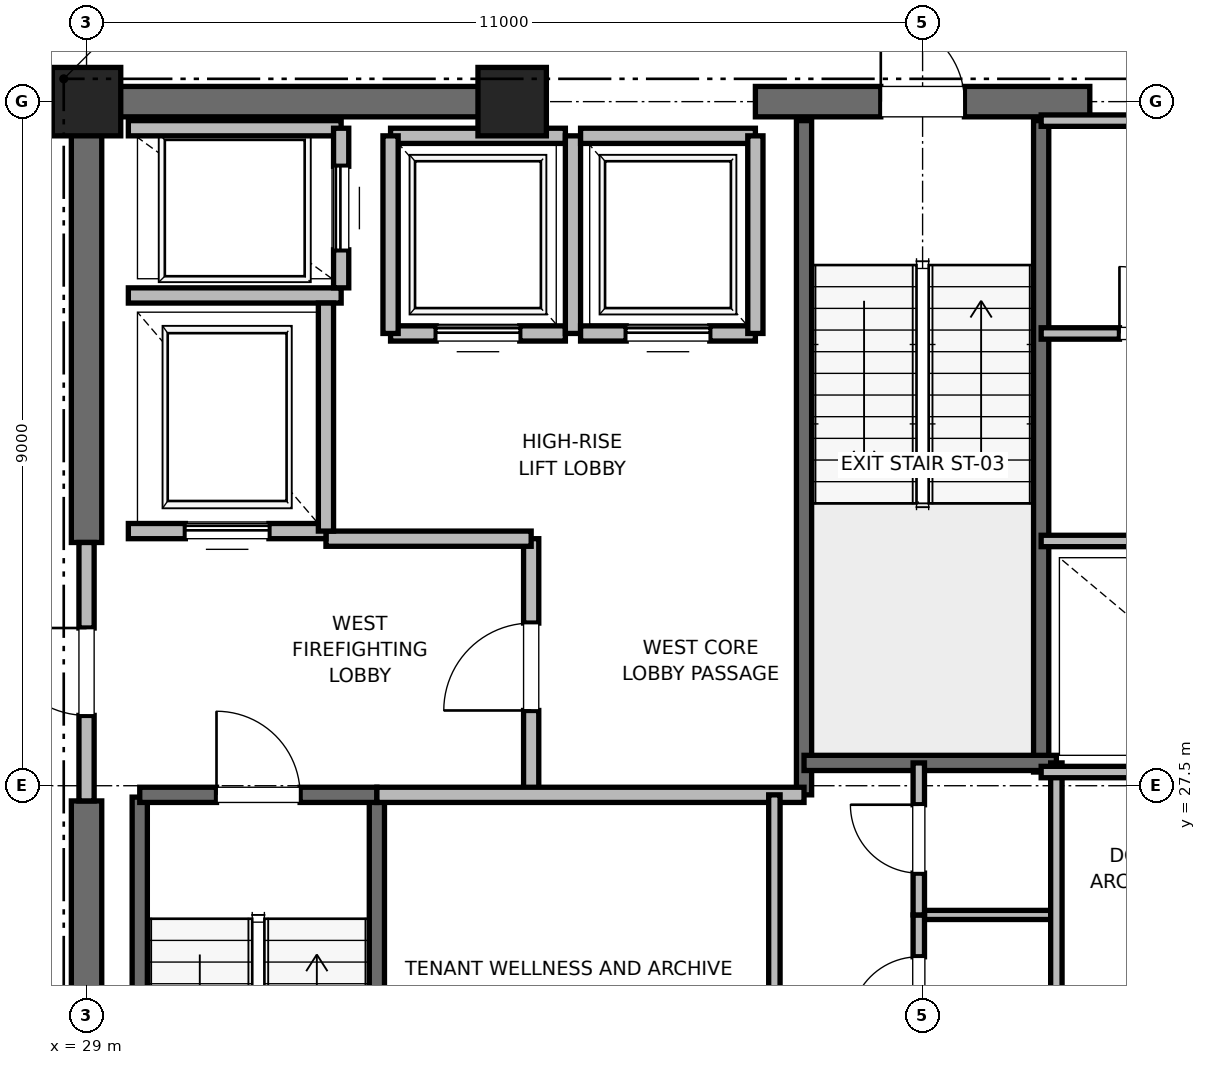
"""IFC4 building model, lengths in metres.
Left out: names, types, materials, properties, quantities, classifications, styles, units other than length and angle.
Written with IfcOpenShell. Run it as: python <this file> out.ifc"""

import sys

from ifc_helpers import new_model, si_unit, direction, frame, frame_2d, origin, origin_2d, place, context, subcontext, project, spatial, rectangle, extrude, element, fill, save


model = new_model("IFC4")
c1 = context("Model", 3, precision=1e-05, world=origin(), true_north=direction((0.0, 1.0)))
c2 = subcontext(c1, "Body", "Model", "MODEL_VIEW")
j1 = project(units=[si_unit("LENGTHUNIT", "METRE"), si_unit("PLANEANGLEUNIT", "RADIAN")], contexts=[c1])
p1 = place(None, origin())
s1 = spatial("IfcSite", under=j1, at=p1, CompositionType="ELEMENT")
p2 = place(p1, origin())
s2 = spatial("IfcBuilding", under=s1, at=p2, CompositionType="ELEMENT")
p3 = place(p2, frame((0.0, 0.0, 310.8)))
s3 = spatial("IfcBuildingStorey", under=s2, at=p3, CompositionType="ELEMENT", Elevation=310.8)
for number, where, z_axis, x_axis in (
    (1, (29.0, 36.5, 0.0), (0.0, 0.0, 1.0), (1.0, 0.0, 0.0)),
    (2, (34.6, 36.5, 0.0), (0.0, 0.0, 1.0), (1.0, 0.0, 0.0)),
):
    element("IfcColumn", number, at=place(p3, frame(where, z_axis=z_axis, x_axis=x_axis)), inside=s3, PredefinedType="PILASTER", context=c2, shape_type="SweptSolid", body=[
        extrude(rectangle(XDim=0.9, YDim=0.9, at=origin_2d()), origin(), (0.0, 0.0, 1.0), 4.0),
    ])
p4 = place(p3, frame((29.0, 36.5, 0.0), z_axis=(0.0, 0.0, 1.0), x_axis=(1.0, 0.0, 0.0)))
e3 = element("IfcWall", 3, at=p4, inside=s3, PredefinedType="SHEAR", context=c2, shape_type="SweptSolid", body=[
    extrude(rectangle(XDim=5.8, YDim=0.4, at=frame_2d((2.9, 0.0))), origin(), (0.0, 0.0, 1.0), 3.785),
])
p5 = place(p3, frame((37.8, 36.5, 0.0), z_axis=(0.0, 0.0, 1.0), x_axis=(1.0, 0.0, 0.0)))
e4 = element("IfcWall", 4, at=p5, inside=s3, PredefinedType="SHEAR", context=c2, shape_type="SweptSolid", body=[
    extrude(rectangle(XDim=4.4, YDim=0.4, at=frame_2d((2.2, 0.0))), origin(), (0.0, 0.0, 1.0), 3.785),
])
p6 = place(p5, frame((1.65, 0.0, 0.0)))
e5 = element("IfcOpeningElement", 5, at=p6, cuts=e4, PredefinedType="OPENING", context=c2, shape_type="SweptSolid", body=[
    extrude(rectangle(XDim=1.1, YDim=2.15, at=frame_2d((0.55, 1.075))), frame((0.0, 0.2, 0.0), z_axis=(0.0, -1.0, 0.0), x_axis=(1.0, 0.0, 0.0)), (0.0, 0.0, 1.0), 0.4),
])
p7 = place(p3, frame((29.0, 18.5, 0.0), z_axis=(0.0, 0.0, 1.0), x_axis=(0.0, 1.0, 0.0)))
e6 = element("IfcWall", 6, at=p7, inside=s3, PredefinedType="SHEAR", context=c2, shape_type="SweptSolid", body=[
    extrude(rectangle(XDim=8.8, YDim=0.4, at=frame_2d((4.4, 0.0))), origin(), (0.0, 0.0, 1.0), 3.785),
])
p8 = place(p3, frame((29.0, 30.7, 0.0), z_axis=(0.0, 0.0, 1.0), x_axis=(0.0, 1.0, 0.0)))
e7 = element("IfcWall", 7, at=p8, inside=s3, PredefinedType="SHEAR", context=c2, shape_type="SweptSolid", body=[
    extrude(rectangle(XDim=5.8, YDim=0.4, at=frame_2d((2.9, 0.0))), origin(), (0.0, 0.0, 1.0), 3.785),
])
p9 = place(p3, frame((29.7, 19.2, 0.0), z_axis=(0.0, 0.0, 1.0), x_axis=(0.0, 1.0, 0.0)))
e8 = element("IfcWall", 8, at=p9, inside=s3, PredefinedType="SOLIDWALL", context=c2, shape_type="SweptSolid", body=[
    extrude(rectangle(XDim=8.15, YDim=0.2, at=frame_2d((4.075, 0.0))), origin(), (0.0, 0.0, 1.0), 3.785),
])
p10 = place(p3, frame((32.82, 18.6, 0.0), z_axis=(0.0, 0.0, 1.0), x_axis=(0.0, 1.0, 0.0)))
e9 = element("IfcWall", 9, at=p10, inside=s3, PredefinedType="SOLIDWALL", context=c2, shape_type="SweptSolid", body=[
    extrude(rectangle(XDim=8.78, YDim=0.2, at=frame_2d((4.39, 0.0))), origin(), (0.0, 0.0, 1.0), 3.785),
])
p11 = place(p3, frame((29.7, 27.38, 0.0), z_axis=(0.0, 0.0, 1.0), x_axis=(1.0, 0.0, 0.0)))
e10 = element("IfcWall", 10, at=p11, inside=s3, PredefinedType="SOLIDWALL", context=c2, shape_type="SweptSolid", body=[
    extrude(rectangle(XDim=3.12, YDim=0.2, at=frame_2d((1.56, 0.0))), origin(), (0.0, 0.0, 1.0), 3.785),
])
p12 = place(p11, frame((1.01, 0.0, 0.0)))
e11 = element("IfcOpeningElement", 11, at=p12, cuts=e10, PredefinedType="OPENING", context=c2, shape_type="SweptSolid", body=[
    extrude(rectangle(XDim=1.1, YDim=2.15, at=frame_2d((0.55, 1.075))), frame((0.0, 0.1, 0.0), z_axis=(0.0, -1.0, 0.0), x_axis=(1.0, 0.0, 0.0)), (0.0, 0.0, 1.0), 0.2),
])
p13 = place(p3, frame((38.44, 27.38, 0.0), z_axis=(0.0, 0.0, 1.0), x_axis=(0.0, 1.0, 0.0)))
e12 = element("IfcWall", 12, at=p13, inside=s3, PredefinedType="SOLIDWALL", context=c2, shape_type="SweptSolid", body=[
    extrude(rectangle(XDim=8.87, YDim=0.2, at=frame_2d((4.435, 0.0))), origin(), (0.0, 0.0, 1.0), 3.785),
])
p14 = place(p3, frame((41.56, 27.68, 0.0), z_axis=(0.0, 0.0, 1.0), x_axis=(0.0, 1.0, 0.0)))
e13 = element("IfcWall", 13, at=p14, inside=s3, PredefinedType="SOLIDWALL", context=c2, shape_type="SweptSolid", body=[
    extrude(rectangle(XDim=8.57, YDim=0.2, at=frame_2d((4.285, 0.0))), origin(), (0.0, 0.0, 1.0), 3.785),
])
p15 = place(p3, frame((38.44, 27.8, 0.0), z_axis=(0.0, 0.0, 1.0), x_axis=(1.0, 0.0, 0.0)))
e14 = element("IfcWall", 14, at=p15, inside=s3, PredefinedType="SOLIDWALL", context=c2, shape_type="SweptSolid", body=[
    extrude(rectangle(XDim=3.32, YDim=0.2, at=frame_2d((1.66, 0.0))), origin(), (0.0, 0.0, 1.0), 3.785),
])
p16 = place(p3, frame((34.85, 27.38, 0.0), z_axis=(0.0, 0.0, 1.0), x_axis=(0.0, 1.0, 0.0)))
e15 = element("IfcWall", 15, at=p16, inside=s3, PredefinedType="PARTITIONING", context=c2, shape_type="SweptSolid", body=[
    extrude(rectangle(XDim=3.37, YDim=0.2, at=frame_2d((1.685, 0.0))), origin(), (0.0, 0.0, 1.0), 3.785),
])
p17 = place(p16, frame((1.11, 0.0, 0.0)))
e16 = element("IfcOpeningElement", 16, at=p17, cuts=e15, PredefinedType="OPENING", context=c2, shape_type="SweptSolid", body=[
    extrude(rectangle(XDim=1.15, YDim=2.2, at=frame_2d((0.575, 1.1))), frame((0.0, 0.1, 0.0), z_axis=(0.0, -1.0, 0.0), x_axis=(1.0, 0.0, 0.0)), (0.0, 0.0, 1.0), 0.2),
])
p18 = place(p3, frame((29.0, 27.3, 0.0), z_axis=(0.0, 0.0, 1.0), x_axis=(0.0, 1.0, 0.0)))
e17 = element("IfcWall", 17, at=p18, inside=s3, PredefinedType="PARTITIONING", context=c2, shape_type="SweptSolid", body=[
    extrude(rectangle(XDim=3.4, YDim=0.2, at=frame_2d((1.7, 0.0))), origin(), (0.0, 0.0, 1.0), 2.865),
])
p19 = place(p18, frame((1.125, 0.0, 0.0)))
e18 = element("IfcOpeningElement", 18, at=p19, cuts=e17, PredefinedType="OPENING", context=c2, shape_type="SweptSolid", body=[
    extrude(rectangle(XDim=1.15, YDim=2.2, at=frame_2d((0.575, 1.1))), frame((0.0, 0.1, 0.0), z_axis=(0.0, -1.0, 0.0), x_axis=(1.0, 0.0, 0.0)), (0.0, 0.0, 1.0), 0.2),
])
p20 = place(p3, frame((32.82, 27.38, 0.0), z_axis=(0.0, 0.0, 1.0), x_axis=(1.0, 0.0, 0.0)))
e19 = element("IfcWall", 19, at=p20, inside=s3, PredefinedType="PARTITIONING", context=c2, shape_type="SweptSolid", body=[
    extrude(rectangle(XDim=5.62, YDim=0.2, at=frame_2d((2.81, 0.0))), origin(), (0.0, 0.0, 1.0), 3.785),
])
p21 = place(p3, frame((32.15, 30.75, 0.0), z_axis=(0.0, 0.0, 1.0), x_axis=(1.0, 0.0, 0.0)))
e20 = element("IfcWall", 20, at=p21, inside=s3, PredefinedType="PARTITIONING", context=c2, shape_type="SweptSolid", body=[
    extrude(rectangle(XDim=2.7, YDim=0.2, at=frame_2d((1.35, 0.0))), origin(), (0.0, 0.0, 1.0), 3.785),
])
p22 = place(p3, frame((29.55, 30.85, 0.0), z_axis=(0.0, 0.0, 1.0), x_axis=(1.0, 0.0, 0.0)))
e21 = element("IfcWall", 21, at=p22, inside=s3, PredefinedType="SOLIDWALL", context=c2, shape_type="SweptSolid", body=[
    extrude(rectangle(XDim=2.6, YDim=0.2, at=frame_2d((1.3, 0.0))), origin(), (0.0, 0.0, 1.0), 2.865),
])
p23 = place(p22, frame((0.75, 0.0, 0.0)))
e22 = element("IfcOpeningElement", 22, at=p23, cuts=e21, PredefinedType="OPENING", context=c2, shape_type="SweptSolid", body=[
    extrude(rectangle(XDim=1.1, YDim=2.2, at=frame_2d((0.55, 1.1))), frame((0.0, 0.1, 0.0), z_axis=(0.0, -1.0, 0.0), x_axis=(1.0, 0.0, 0.0)), (0.0, 0.0, 1.0), 0.2),
])
p24 = place(p3, frame((29.55, 33.95, 0.0), z_axis=(0.0, 0.0, 1.0), x_axis=(1.0, 0.0, 0.0)))
e23 = element("IfcWall", 23, at=p24, inside=s3, PredefinedType="SOLIDWALL", context=c2, shape_type="SweptSolid", body=[
    extrude(rectangle(XDim=2.8, YDim=0.2, at=frame_2d((1.4, 0.0))), origin(), (0.0, 0.0, 1.0), 3.785),
])
p25 = place(p3, frame((32.15, 30.85, 0.0), z_axis=(0.0, 0.0, 1.0), x_axis=(0.0, 1.0, 0.0)))
e24 = element("IfcWall", 24, at=p25, inside=s3, PredefinedType="SOLIDWALL", context=c2, shape_type="SweptSolid", body=[
    extrude(rectangle(XDim=3.0, YDim=0.2, at=frame_2d((1.5, 0.0))), origin(), (0.0, 0.0, 1.0), 3.785),
])
p26 = place(p3, frame((32.35, 36.15, 0.0), z_axis=(0.0, 0.0, 1.0), x_axis=(-1.0, 0.0, 0.0)))
e25 = element("IfcWall", 25, at=p26, inside=s3, PredefinedType="SOLIDWALL", context=c2, shape_type="SweptSolid", body=[
    extrude(rectangle(XDim=2.8, YDim=0.2, at=frame_2d((1.4, 0.0))), origin(), (0.0, 0.0, 1.0), 3.22),
])
p27 = place(p3, frame((32.35, 34.05, 0.0), z_axis=(0.0, 0.0, 1.0), x_axis=(0.0, 1.0, 0.0)))
e26 = element("IfcWall", 26, at=p27, inside=s3, PredefinedType="SOLIDWALL", context=c2, shape_type="SweptSolid", body=[
    extrude(rectangle(XDim=2.1, YDim=0.2, at=frame_2d((1.05, 0.0))), origin(), (0.0, 0.0, 1.0), 3.785),
])
p28 = place(p27, frame((0.5, 0.0, 0.0)))
e27 = element("IfcOpeningElement", 27, at=p28, cuts=e26, PredefinedType="OPENING", context=c2, shape_type="SweptSolid", body=[
    extrude(rectangle(XDim=1.1, YDim=2.2, at=frame_2d((0.55, 1.1))), frame((0.0, 0.1, 0.0), z_axis=(0.0, -1.0, 0.0), x_axis=(1.0, 0.0, 0.0)), (0.0, 0.0, 1.0), 0.2),
])
p29 = place(p3, frame((33.0, 33.45, 0.0), z_axis=(0.0, 0.0, 1.0), x_axis=(1.0, 0.0, 0.0)))
e28 = element("IfcWall", 28, at=p29, inside=s3, PredefinedType="SOLIDWALL", context=c2, shape_type="SweptSolid", body=[
    extrude(rectangle(XDim=2.3, YDim=0.2, at=frame_2d((1.15, 0.0))), origin(), (0.0, 0.0, 1.0), 3.785),
])
p30 = place(p29, frame((0.6, 0.0, 0.0)))
e29 = element("IfcOpeningElement", 29, at=p30, cuts=e28, PredefinedType="OPENING", context=c2, shape_type="SweptSolid", body=[
    extrude(rectangle(XDim=1.1, YDim=2.2, at=frame_2d((0.55, 1.1))), frame((0.0, 0.1, 0.0), z_axis=(0.0, -1.0, 0.0), x_axis=(1.0, 0.0, 0.0)), (0.0, 0.0, 1.0), 0.2),
])
p31 = place(p3, frame((35.3, 36.05, 0.0), z_axis=(0.0, 0.0, 1.0), x_axis=(-1.0, 0.0, 0.0)))
e30 = element("IfcWall", 30, at=p31, inside=s3, PredefinedType="SOLIDWALL", context=c2, shape_type="SweptSolid", body=[
    extrude(rectangle(XDim=2.3, YDim=0.2, at=frame_2d((1.15, 0.0))), origin(), (0.0, 0.0, 1.0), 2.865),
])
p32 = place(p3, frame((33.0, 36.05, 0.0), z_axis=(0.0, 0.0, 1.0), x_axis=(0.0, -1.0, 0.0)))
e31 = element("IfcWall", 31, at=p32, inside=s3, PredefinedType="SOLIDWALL", context=c2, shape_type="SweptSolid", body=[
    extrude(rectangle(XDim=2.6, YDim=0.2, at=frame_2d((1.3, 0.0))), origin(), (0.0, 0.0, 1.0), 3.785),
])
p33 = place(p3, frame((35.4, 33.45, 0.0), z_axis=(0.0, 0.0, 1.0), x_axis=(0.0, 1.0, 0.0)))
e32 = element("IfcWall", 32, at=p33, inside=s3, PredefinedType="SOLIDWALL", context=c2, shape_type="SweptSolid", body=[
    extrude(rectangle(XDim=2.6, YDim=0.2, at=frame_2d((1.3, 0.0))), origin(), (0.0, 0.0, 1.0), 2.865),
])
p34 = place(p3, frame((35.5, 33.45, 0.0), z_axis=(0.0, 0.0, 1.0), x_axis=(1.0, 0.0, 0.0)))
e33 = element("IfcWall", 33, at=p34, inside=s3, PredefinedType="SOLIDWALL", context=c2, shape_type="SweptSolid", body=[
    extrude(rectangle(XDim=2.3, YDim=0.2, at=frame_2d((1.15, 0.0))), origin(), (0.0, 0.0, 1.0), 3.785),
])
p35 = place(p34, frame((0.6, 0.0, 0.0)))
e34 = element("IfcOpeningElement", 34, at=p35, cuts=e33, PredefinedType="OPENING", context=c2, shape_type="SweptSolid", body=[
    extrude(rectangle(XDim=1.1, YDim=2.2, at=frame_2d((0.55, 1.1))), frame((0.0, 0.1, 0.0), z_axis=(0.0, -1.0, 0.0), x_axis=(1.0, 0.0, 0.0)), (0.0, 0.0, 1.0), 0.2),
])
p36 = place(p3, frame((37.8, 36.05, 0.0), z_axis=(0.0, 0.0, 1.0), x_axis=(-1.0, 0.0, 0.0)))
e35 = element("IfcWall", 35, at=p36, inside=s3, PredefinedType="SOLIDWALL", context=c2, shape_type="SweptSolid", body=[
    extrude(rectangle(XDim=2.3, YDim=0.2, at=frame_2d((1.15, 0.0))), origin(), (0.0, 0.0, 1.0), 2.865),
])
p37 = place(p3, frame((37.8, 33.45, 0.0), z_axis=(0.0, 0.0, 1.0), x_axis=(0.0, 1.0, 0.0)))
e36 = element("IfcWall", 36, at=p37, inside=s3, PredefinedType="SOLIDWALL", context=c2, shape_type="SweptSolid", body=[
    extrude(rectangle(XDim=2.6, YDim=0.2, at=frame_2d((1.3, 0.0))), origin(), (0.0, 0.0, 1.0), 2.865),
])
p38 = place(p3, frame((39.95, 25.8, 0.0), z_axis=(0.0, 0.0, 1.0), x_axis=(1.0, 0.0, 0.0)))
e37 = element("IfcWall", 37, at=p38, inside=s3, PredefinedType="PARTITIONING", context=c2, shape_type="SweptSolid", body=[
    extrude(rectangle(XDim=1.81, YDim=0.12, at=frame_2d((0.905, 0.0))), origin(), (0.0, 0.0, 1.0), 2.85),
])
p39 = place(p3, frame((41.76, 23.8, 0.0), z_axis=(0.0, 0.0, 1.0), x_axis=(0.0, 1.0, 0.0)))
e38 = element("IfcWall", 38, at=p39, inside=s3, PredefinedType="PARTITIONING", context=c2, shape_type="SweptSolid", body=[
    extrude(rectangle(XDim=4.0, YDim=0.15, at=frame_2d((2.0, 0.0))), origin(), (0.0, 0.0, 1.0), 2.85),
])
p40 = place(p3, frame((39.95, 23.8, 0.0), z_axis=(0.0, 0.0, 1.0), x_axis=(0.0, 1.0, 0.0)))
e39 = element("IfcWall", 39, at=p40, inside=s3, PredefinedType="PARTITIONING", context=c2, shape_type="SweptSolid", body=[
    extrude(rectangle(XDim=2.0, YDim=0.15, at=frame_2d((1.0, 0.0))), origin(), (0.0, 0.0, 1.0), 2.85),
])
p41 = place(p40, frame((0.55, 0.0, 0.0)))
e40 = element("IfcOpeningElement", 40, at=p41, cuts=e39, PredefinedType="OPENING", context=c2, shape_type="SweptSolid", body=[
    extrude(rectangle(XDim=0.9, YDim=2.1, at=frame_2d((0.45, 1.05))), frame((0.0, 0.075, 0.0), z_axis=(0.0, -1.0, 0.0), x_axis=(1.0, 0.0, 0.0)), (0.0, 0.0, 1.0), 0.15),
])
p42 = place(p3, frame((39.95, 25.8, 0.0), z_axis=(0.0, 0.0, 1.0), x_axis=(0.0, 1.0, 0.0)))
e41 = element("IfcWall", 41, at=p42, inside=s3, PredefinedType="PARTITIONING", context=c2, shape_type="SweptSolid", body=[
    extrude(rectangle(XDim=2.0, YDim=0.15, at=frame_2d((1.0, 0.0))), origin(), (0.0, 0.0, 1.0), 2.85),
])
p43 = place(p42, frame((0.55, 0.0, 0.0)))
e42 = element("IfcOpeningElement", 42, at=p43, cuts=e41, PredefinedType="OPENING", context=c2, shape_type="SweptSolid", body=[
    extrude(rectangle(XDim=0.9, YDim=2.1, at=frame_2d((0.45, 1.05))), frame((0.0, 0.075, 0.0), z_axis=(0.0, -1.0, 0.0), x_axis=(1.0, 0.0, 0.0)), (0.0, 0.0, 1.0), 0.15),
])
p44 = place(p3, frame((38.05, 18.6, 0.0), z_axis=(0.0, 0.0, 1.0), x_axis=(0.0, 1.0, 0.0)))
e43 = element("IfcWall", 43, at=p44, inside=s3, PredefinedType="PARTITIONING", context=c2, shape_type="SweptSolid", body=[
    extrude(rectangle(XDim=8.78, YDim=0.15, at=frame_2d((4.39, 0.0))), origin(), (0.0, 0.0, 1.0), 2.85),
])
p45 = place(p44, frame((3.89, 0.0, 0.0)))
e44 = element("IfcOpeningElement", 44, at=p45, cuts=e43, PredefinedType="OPENING", context=c2, shape_type="SweptSolid", body=[
    extrude(rectangle(XDim=1.0, YDim=2.15, at=frame_2d((0.5, 1.075))), frame((0.0, 0.075, 0.0), z_axis=(0.0, -1.0, 0.0), x_axis=(1.0, 0.0, 0.0)), (0.0, 0.0, 1.0), 0.15),
])
p46 = place(p3, frame((41.56, 27.68, 0.0), z_axis=(0.0, 0.0, 1.0), x_axis=(1.0, 0.0, 0.0)))
e45 = element("IfcWall", 45, at=p46, inside=s3, PredefinedType="PARTITIONING", context=c2, shape_type="SweptSolid", body=[
    extrude(rectangle(XDim=3.59, YDim=0.15, at=frame_2d((1.795, 0.0))), origin(), (0.0, 0.0, 1.0), 2.85),
])
p47 = place(p3, frame((41.56, 30.72, 0.0), z_axis=(0.0, 0.0, 1.0), x_axis=(1.0, 0.0, 0.0)))
e46 = element("IfcWall", 46, at=p47, inside=s3, PredefinedType="PARTITIONING", context=c2, shape_type="SweptSolid", body=[
    extrude(rectangle(XDim=3.59, YDim=0.15, at=frame_2d((1.795, 0.0))), origin(), (0.0, 0.0, 1.0), 2.85),
])
p48 = place(p47, frame((1.355, 0.0, 0.0)))
e47 = element("IfcOpeningElement", 47, at=p48, cuts=e46, PredefinedType="OPENING", context=c2, shape_type="SweptSolid", body=[
    extrude(rectangle(XDim=0.88, YDim=2.1, at=frame_2d((0.44, 1.05))), frame((0.0, 0.075, 0.0), z_axis=(0.0, -1.0, 0.0), x_axis=(1.0, 0.0, 0.0)), (0.0, 0.0, 1.0), 0.15),
])
p49 = place(p3, frame((41.56, 36.25, 0.0), z_axis=(0.0, 0.0, 1.0), x_axis=(1.0, 0.0, 0.0)))
e48 = element("IfcWall", 48, at=p49, inside=s3, PredefinedType="PARTITIONING", context=c2, shape_type="SweptSolid", body=[
    extrude(rectangle(XDim=2.94, YDim=0.15, at=frame_2d((1.47, 0.0))), origin(), (0.0, 0.0, 1.0), 2.85),
])
p50 = place(p3, frame((41.56, 33.45, 0.0), z_axis=(0.0, 0.0, 1.0), x_axis=(1.0, 0.0, 0.0)))
e49 = element("IfcWall", 49, at=p50, inside=s3, PredefinedType="PARTITIONING", context=c2, shape_type="SweptSolid", body=[
    extrude(rectangle(XDim=2.94, YDim=0.15, at=frame_2d((1.47, 0.0))), origin(), (0.0, 0.0, 1.0), 2.85),
])
p51 = place(p50, frame((1.03, 0.0, 0.0)))
e50 = element("IfcOpeningElement", 50, at=p51, cuts=e49, PredefinedType="OPENING", context=c2, shape_type="SweptSolid", body=[
    extrude(rectangle(XDim=0.88, YDim=2.1, at=frame_2d((0.44, 1.05))), frame((0.0, 0.075, 0.0), z_axis=(0.0, -1.0, 0.0), x_axis=(1.0, 0.0, 0.0)), (0.0, 0.0, 1.0), 0.15),
])
p52 = place(p12, origin())
e51 = element("IfcDoor", 51, at=p52, inside=s3, OperationType="SINGLE_SWING_LEFT", PredefinedType="DOOR", context=c2, shape_type="SweptSolid", body=[
    extrude(rectangle(XDim=1.1, YDim=2.15, at=frame_2d((0.55, 1.075))), frame((0.0, 0.025, 0.0), z_axis=(0.0, -1.0, 0.0), x_axis=(1.0, 0.0, 0.0)), (0.0, 0.0, 1.0), 0.05),
])
fill(e11, e51)
p53 = place(p6, origin())
e52 = element("IfcDoor", 52, at=p53, inside=s3, OperationType="SINGLE_SWING_LEFT", PredefinedType="DOOR", context=c2, shape_type="SweptSolid", body=[
    extrude(rectangle(XDim=1.1, YDim=2.15, at=frame_2d((0.55, 1.075))), frame((0.0, 0.025, 0.0), z_axis=(0.0, -1.0, 0.0), x_axis=(1.0, 0.0, 0.0)), (0.0, 0.0, 1.0), 0.05),
])
fill(e5, e52)
p54 = place(p17, origin())
e53 = element("IfcDoor", 53, at=p54, inside=s3, OperationType="SINGLE_SWING_LEFT", PredefinedType="DOOR", context=c2, shape_type="SweptSolid", body=[
    extrude(rectangle(XDim=1.15, YDim=2.2, at=frame_2d((0.575, 1.1))), frame((0.0, 0.025, 0.0), z_axis=(0.0, -1.0, 0.0), x_axis=(1.0, 0.0, 0.0)), (0.0, 0.0, 1.0), 0.05),
])
fill(e16, e53)
p55 = place(p19, origin())
e54 = element("IfcDoor", 54, at=p55, inside=s3, OperationType="SINGLE_SWING_RIGHT", PredefinedType="DOOR", context=c2, shape_type="SweptSolid", body=[
    extrude(rectangle(XDim=1.15, YDim=2.2, at=frame_2d((0.575, 1.1))), frame((0.0, 0.025, 0.0), z_axis=(0.0, -1.0, 0.0), x_axis=(1.0, 0.0, 0.0)), (0.0, 0.0, 1.0), 0.05),
])
fill(e18, e54)
p56 = place(p23, origin())
e55 = element("IfcDoor", 55, at=p56, inside=s3, OperationType="SLIDING_TO_RIGHT", PredefinedType="DOOR", context=c2, shape_type="SweptSolid", body=[
    extrude(rectangle(XDim=1.1, YDim=2.2, at=frame_2d((0.55, 1.1))), frame((0.0, 0.025, 0.0), z_axis=(0.0, -1.0, 0.0), x_axis=(1.0, 0.0, 0.0)), (0.0, 0.0, 1.0), 0.05),
])
fill(e22, e55)
p57 = place(p28, origin())
e56 = element("IfcDoor", 56, at=p57, inside=s3, OperationType="SLIDING_TO_RIGHT", PredefinedType="DOOR", context=c2, shape_type="SweptSolid", body=[
    extrude(rectangle(XDim=1.1, YDim=2.2, at=frame_2d((0.55, 1.1))), frame((0.0, 0.025, 0.0), z_axis=(0.0, -1.0, 0.0), x_axis=(1.0, 0.0, 0.0)), (0.0, 0.0, 1.0), 0.05),
])
fill(e27, e56)
p58 = place(p30, origin())
e57 = element("IfcDoor", 57, at=p58, inside=s3, OperationType="SLIDING_TO_RIGHT", PredefinedType="DOOR", context=c2, shape_type="SweptSolid", body=[
    extrude(rectangle(XDim=1.1, YDim=2.2, at=frame_2d((0.55, 1.1))), frame((0.0, 0.025, 0.0), z_axis=(0.0, -1.0, 0.0), x_axis=(1.0, 0.0, 0.0)), (0.0, 0.0, 1.0), 0.05),
])
fill(e29, e57)
p59 = place(p35, origin())
e58 = element("IfcDoor", 58, at=p59, inside=s3, OperationType="SLIDING_TO_RIGHT", PredefinedType="DOOR", context=c2, shape_type="SweptSolid", body=[
    extrude(rectangle(XDim=1.1, YDim=2.2, at=frame_2d((0.55, 1.1))), frame((0.0, 0.025, 0.0), z_axis=(0.0, -1.0, 0.0), x_axis=(1.0, 0.0, 0.0)), (0.0, 0.0, 1.0), 0.05),
])
fill(e34, e58)
p60 = place(p41, origin())
e59 = element("IfcDoor", 59, at=p60, inside=s3, OperationType="SINGLE_SWING_LEFT", PredefinedType="DOOR", context=c2, shape_type="SweptSolid", body=[
    extrude(rectangle(XDim=0.9, YDim=2.1, at=frame_2d((0.45, 1.05))), frame((0.0, 0.025, 0.0), z_axis=(0.0, -1.0, 0.0), x_axis=(1.0, 0.0, 0.0)), (0.0, 0.0, 1.0), 0.05),
])
fill(e40, e59)
p61 = place(p43, origin())
e60 = element("IfcDoor", 60, at=p61, inside=s3, OperationType="SINGLE_SWING_RIGHT", PredefinedType="DOOR", context=c2, shape_type="SweptSolid", body=[
    extrude(rectangle(XDim=0.9, YDim=2.1, at=frame_2d((0.45, 1.05))), frame((0.0, 0.025, 0.0), z_axis=(0.0, -1.0, 0.0), x_axis=(1.0, 0.0, 0.0)), (0.0, 0.0, 1.0), 0.05),
])
fill(e42, e60)
p62 = place(p51, origin())
e61 = element("IfcDoor", 61, at=p62, inside=s3, OperationType="SINGLE_SWING_LEFT", PredefinedType="DOOR", context=c2, shape_type="SweptSolid", body=[
    extrude(rectangle(XDim=0.88, YDim=2.1, at=frame_2d((0.44, 1.05))), frame((0.0, 0.025, 0.0), z_axis=(0.0, -1.0, 0.0), x_axis=(1.0, 0.0, 0.0)), (0.0, 0.0, 1.0), 0.05),
])
fill(e50, e61)
save(model, sys.argv[1])
